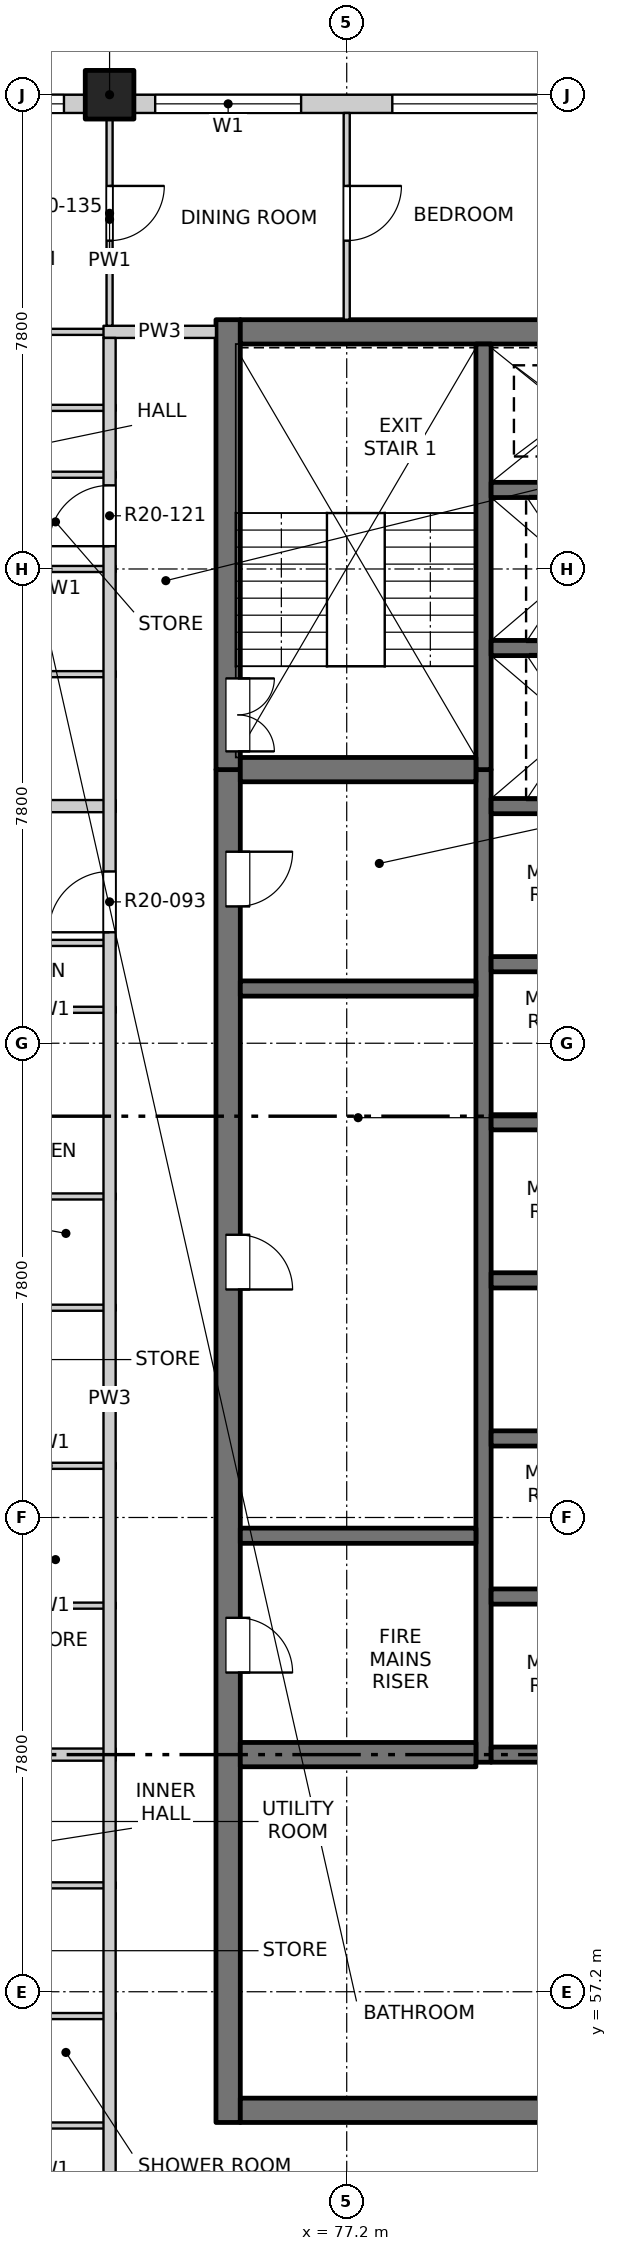
"""IFC4 building model, lengths in metres.
Left out: names, types, materials, properties, quantities, classifications, styles, units other than length and angle.
Written with IfcOpenShell. Run it as: python <this file> out.ifc"""

import sys

from ifc_helpers import new_model, si_unit, direction, frame, frame_2d, origin, origin_2d, place, context, subcontext, project, spatial, rectangle, extrude, element, fill, save


model = new_model("IFC4")
c1 = context("Model", 3, precision=1e-05, world=origin(), true_north=direction((0.0, 1.0)))
c2 = subcontext(c1, "Body", "Model", "MODEL_VIEW")
j1 = project(units=[si_unit("LENGTHUNIT", "METRE"), si_unit("PLANEANGLEUNIT", "RADIAN")], contexts=[c1])
p1 = place(None, origin())
s1 = spatial("IfcSite", under=j1, at=p1, CompositionType="ELEMENT")
p2 = place(p1, origin())
s2 = spatial("IfcBuilding", under=s1, at=p2, CompositionType="ELEMENT")
p3 = place(p2, frame((0.0, 0.0, 204.1)))
s3 = spatial("IfcBuildingStorey", under=s2, at=p3, CompositionType="ELEMENT", Elevation=204.1)
p4 = place(p3, frame((73.3, 88.4, -0.25), z_axis=(0.0, 0.0, 1.0), x_axis=(1.0, 0.0, 0.0)))
e1 = element("IfcColumn", 1, at=p4, inside=s3, PredefinedType="COLUMN", context=c2, shape_type="SweptSolid", body=[
    extrude(rectangle(XDim=0.8, YDim=0.8, at=origin_2d()), origin(), (0.0, 0.0, 1.0), 3.4),
])
p5 = place(p3, frame((75.25, 55.05, -0.25), z_axis=(0.0, 0.0, 1.0), x_axis=(0.0, 1.0, 0.0)))
e2 = element("IfcWall", 2, at=p5, inside=s3, PredefinedType="SOLIDWALL", context=c2, shape_type="SweptSolid", body=[
    extrude(rectangle(XDim=22.25, YDim=0.4, at=frame_2d((11.125, 0.0))), origin(), (0.0, 0.0, 1.0), 3.4),
])
p6 = place(p5, frame((7.4, 0.0, 0.25)))
e3 = element("IfcOpeningElement", 3, at=p6, cuts=e2, PredefinedType="OPENING", context=c2, shape_type="SweptSolid", body=[
    extrude(rectangle(XDim=0.9, YDim=2.1, at=frame_2d((0.45, 1.05))), frame((0.0, 0.21, 0.0), z_axis=(0.0, -1.0, 0.0), x_axis=(1.0, 0.0, 0.0)), (0.0, 0.0, 1.0), 0.42),
])
p7 = place(p5, frame((13.7, 0.0, 0.25)))
e4 = element("IfcOpeningElement", 4, at=p7, cuts=e2, PredefinedType="OPENING", context=c2, shape_type="SweptSolid", body=[
    extrude(rectangle(XDim=0.9, YDim=2.1, at=frame_2d((0.45, 1.05))), frame((0.0, 0.21, 0.0), z_axis=(0.0, -1.0, 0.0), x_axis=(1.0, 0.0, 0.0)), (0.0, 0.0, 1.0), 0.42),
])
p8 = place(p5, frame((20.0, 0.0, 0.25)))
e5 = element("IfcOpeningElement", 5, at=p8, cuts=e2, PredefinedType="OPENING", context=c2, shape_type="SweptSolid", body=[
    extrude(rectangle(XDim=0.9, YDim=2.1, at=frame_2d((0.45, 1.05))), frame((0.0, 0.21, 0.0), z_axis=(0.0, -1.0, 0.0), x_axis=(1.0, 0.0, 0.0)), (0.0, 0.0, 1.0), 0.42),
])
p9 = place(p3, frame((75.25, 77.3, -0.25), z_axis=(0.0, 0.0, 1.0), x_axis=(0.0, 1.0, 0.0)))
e6 = element("IfcWall", 6, at=p9, inside=s3, PredefinedType="SOLIDWALL", context=c2, shape_type="SweptSolid", body=[
    extrude(rectangle(XDim=7.4, YDim=0.4, at=frame_2d((3.7, 0.0))), origin(), (0.0, 0.0, 1.0), 3.4),
])
p10 = place(p9, frame((0.3, 0.0, 0.25)))
e7 = element("IfcOpeningElement", 7, at=p10, cuts=e6, PredefinedType="OPENING", context=c2, shape_type="SweptSolid", body=[
    extrude(rectangle(XDim=1.2, YDim=2.1, at=frame_2d((0.6, 1.05))), frame((0.0, 0.21, 0.0), z_axis=(0.0, -1.0, 0.0), x_axis=(1.0, 0.0, 0.0)), (0.0, 0.0, 1.0), 0.42),
])
p11 = place(p3, frame((75.45, 55.25, -0.25), z_axis=(0.0, 0.0, 1.0), x_axis=(1.0, 0.0, 0.0)))
e8 = element("IfcWall", 8, at=p11, inside=s3, PredefinedType="SOLIDWALL", context=c2, shape_type="SweptSolid", body=[
    extrude(rectangle(XDim=19.1, YDim=0.4, at=frame_2d((9.55, 0.0))), origin(), (0.0, 0.0, 1.0), 3.4),
])
p12 = place(p11, frame((8.8, 0.0, 0.25)))
e9 = element("IfcOpeningElement", 9, at=p12, cuts=e8, PredefinedType="OPENING", context=c2, shape_type="SweptSolid", body=[
    extrude(rectangle(XDim=1.5, YDim=2.1, at=frame_2d((0.75, 1.05))), frame((0.0, 0.21, 0.0), z_axis=(0.0, -1.0, 0.0), x_axis=(1.0, 0.0, 0.0)), (0.0, 0.0, 1.0), 0.42),
])
p13 = place(p3, frame((75.45, 84.5, -0.25), z_axis=(0.0, 0.0, 1.0), x_axis=(1.0, 0.0, 0.0)))
e10 = element("IfcWall", 10, at=p13, inside=s3, PredefinedType="SOLIDWALL", context=c2, shape_type="SweptSolid", body=[
    extrude(rectangle(XDim=19.1, YDim=0.4, at=frame_2d((9.55, 0.0))), origin(), (0.0, 0.0, 1.0), 3.4),
])
p14 = place(p3, frame((79.45, 60.975, -0.25), z_axis=(0.0, 0.0, 1.0), x_axis=(0.0, 1.0, 0.0)))
e11 = element("IfcWall", 11, at=p14, inside=s3, PredefinedType="SOLIDWALL", context=c2, shape_type="SweptSolid", body=[
    extrude(rectangle(XDim=16.325, YDim=0.25, at=frame_2d((8.163, 0.0))), origin(), (0.0, 0.0, 1.0), 3.4),
])
p15 = place(p3, frame((79.45, 77.3, -0.25), z_axis=(0.0, 0.0, 1.0), x_axis=(0.0, 1.0, 0.0)))
e12 = element("IfcWall", 12, at=p15, inside=s3, PredefinedType="SOLIDWALL", context=c2, shape_type="SweptSolid", body=[
    extrude(rectangle(XDim=7.0, YDim=0.25, at=frame_2d((3.5, 0.0))), origin(), (0.0, 0.0, 1.0), 3.4),
])
for number, where, z_axis, x_axis in (
    (13, (79.575, 61.1, -0.25), (0.0, 0.0, 1.0), (1.0, 0.0, 0.0)),
    (14, (79.575, 63.7, -0.25), (0.0, 0.0, 1.0), (1.0, 0.0, 0.0)),
    (15, (79.575, 66.3, -0.25), (0.0, 0.0, 1.0), (1.0, 0.0, 0.0)),
    (16, (79.575, 68.9, -0.25), (0.0, 0.0, 1.0), (1.0, 0.0, 0.0)),
    (17, (79.575, 71.5, -0.25), (0.0, 0.0, 1.0), (1.0, 0.0, 0.0)),
    (18, (79.575, 74.1, -0.25), (0.0, 0.0, 1.0), (1.0, 0.0, 0.0)),
    (19, (79.575, 76.7, -0.25), (0.0, 0.0, 1.0), (1.0, 0.0, 0.0)),
    (20, (79.575, 79.3, -0.25), (0.0, 0.0, 1.0), (1.0, 0.0, 0.0)),
    (21, (79.575, 81.9, -0.25), (0.0, 0.0, 1.0), (1.0, 0.0, 0.0)),
):
    element("IfcWall", number, at=place(p3, frame(where, z_axis=z_axis, x_axis=x_axis)), inside=s3, PredefinedType="SOLIDWALL", context=c2, shape_type="SweptSolid", body=[
        extrude(rectangle(XDim=3.0, YDim=0.25, at=frame_2d((1.5, 0.0))), origin(), (0.0, 0.0, 1.0), 3.4),
    ])
p16 = place(p3, frame((75.45, 61.1, -0.25), z_axis=(0.0, 0.0, 1.0), x_axis=(1.0, 0.0, 0.0)))
e22 = element("IfcWall", 22, at=p16, inside=s3, PredefinedType="SOLIDWALL", context=c2, shape_type="SweptSolid", body=[
    extrude(rectangle(XDim=3.875, YDim=0.4, at=frame_2d((1.938, 0.0))), origin(), (0.0, 0.0, 1.0), 3.4),
])
for number, where, z_axis, x_axis in (
    (23, (75.45, 64.7, -0.25), (0.0, 0.0, 1.0), (1.0, 0.0, 0.0)),
    (24, (75.45, 73.7, -0.25), (0.0, 0.0, 1.0), (1.0, 0.0, 0.0)),
):
    element("IfcWall", number, at=place(p3, frame(where, z_axis=z_axis, x_axis=x_axis)), inside=s3, PredefinedType="SOLIDWALL", context=c2, shape_type="SweptSolid", body=[
        extrude(rectangle(XDim=3.875, YDim=0.25, at=frame_2d((1.938, 0.0))), origin(), (0.0, 0.0, 1.0), 3.4),
    ])
p17 = place(p3, frame((75.45, 77.3, -0.25), z_axis=(0.0, 0.0, 1.0), x_axis=(1.0, 0.0, 0.0)))
e25 = element("IfcWall", 25, at=p17, inside=s3, PredefinedType="SOLIDWALL", context=c2, shape_type="SweptSolid", body=[
    extrude(rectangle(XDim=3.875, YDim=0.4, at=frame_2d((1.938, 0.0))), origin(), (0.0, 0.0, 1.0), 3.4),
])
p18 = place(p3, frame((65.5, 88.25, 0.0), z_axis=(0.0, 0.0, 1.0), x_axis=(1.0, 0.0, 0.0)))
e26 = element("IfcWall", 26, at=p18, inside=s3, PredefinedType="SOLIDWALL", context=c2, shape_type="SweptSolid", body=[
    extrude(rectangle(XDim=7.4, YDim=0.3, at=frame_2d((3.7, 0.0))), origin(), (0.0, 0.0, 1.0), 2.7),
])
p19 = place(p18, frame((0.75, 0.0, 0.9)))
e27 = element("IfcOpeningElement", 27, at=p19, cuts=e26, PredefinedType="OPENING", context=c2, shape_type="SweptSolid", body=[
    extrude(rectangle(XDim=2.4, YDim=1.8, at=frame_2d((1.2, 0.9))), frame((0.0, 0.16, 0.0), z_axis=(0.0, -1.0, 0.0), x_axis=(1.0, 0.0, 0.0)), (0.0, 0.0, 1.0), 0.32),
])
p20 = place(p18, frame((4.65, 0.0, 0.9)))
e28 = element("IfcOpeningElement", 28, at=p20, cuts=e26, PredefinedType="OPENING", context=c2, shape_type="SweptSolid", body=[
    extrude(rectangle(XDim=2.4, YDim=1.8, at=frame_2d((1.2, 0.9))), frame((0.0, 0.16, 0.0), z_axis=(0.0, -1.0, 0.0), x_axis=(1.0, 0.0, 0.0)), (0.0, 0.0, 1.0), 0.32),
])
p21 = place(p3, frame((73.7, 88.25, 0.0), z_axis=(0.0, 0.0, 1.0), x_axis=(1.0, 0.0, 0.0)))
e29 = element("IfcWall", 29, at=p21, inside=s3, PredefinedType="SOLIDWALL", context=c2, shape_type="SweptSolid", body=[
    extrude(rectangle(XDim=22.6, YDim=0.3, at=frame_2d((11.3, 0.0))), origin(), (0.0, 0.0, 1.0), 2.7),
])
p22 = place(p21, frame((0.35, 0.0, 0.9)))
e30 = element("IfcOpeningElement", 30, at=p22, cuts=e29, PredefinedType="OPENING", context=c2, shape_type="SweptSolid", body=[
    extrude(rectangle(XDim=2.4, YDim=1.8, at=frame_2d((1.2, 0.9))), frame((0.0, 0.16, 0.0), z_axis=(0.0, -1.0, 0.0), x_axis=(1.0, 0.0, 0.0)), (0.0, 0.0, 1.0), 0.32),
])
p23 = place(p21, frame((4.25, 0.0, 0.9)))
e31 = element("IfcOpeningElement", 31, at=p23, cuts=e29, PredefinedType="OPENING", context=c2, shape_type="SweptSolid", body=[
    extrude(rectangle(XDim=2.4, YDim=1.8, at=frame_2d((1.2, 0.9))), frame((0.0, 0.16, 0.0), z_axis=(0.0, -1.0, 0.0), x_axis=(1.0, 0.0, 0.0)), (0.0, 0.0, 1.0), 0.32),
])
p24 = place(p21, frame((8.15, 0.0, 0.9)))
e32 = element("IfcOpeningElement", 32, at=p24, cuts=e29, PredefinedType="OPENING", context=c2, shape_type="SweptSolid", body=[
    extrude(rectangle(XDim=2.4, YDim=1.8, at=frame_2d((1.2, 0.9))), frame((0.0, 0.16, 0.0), z_axis=(0.0, -1.0, 0.0), x_axis=(1.0, 0.0, 0.0)), (0.0, 0.0, 1.0), 0.32),
])
p25 = place(p21, frame((12.05, 0.0, 0.9)))
e33 = element("IfcOpeningElement", 33, at=p25, cuts=e29, PredefinedType="OPENING", context=c2, shape_type="SweptSolid", body=[
    extrude(rectangle(XDim=2.4, YDim=1.8, at=frame_2d((1.2, 0.9))), frame((0.0, 0.16, 0.0), z_axis=(0.0, -1.0, 0.0), x_axis=(1.0, 0.0, 0.0)), (0.0, 0.0, 1.0), 0.32),
])
p26 = place(p21, frame((15.95, 0.0, 0.9)))
e34 = element("IfcOpeningElement", 34, at=p26, cuts=e29, PredefinedType="OPENING", context=c2, shape_type="SweptSolid", body=[
    extrude(rectangle(XDim=2.4, YDim=1.8, at=frame_2d((1.2, 0.9))), frame((0.0, 0.16, 0.0), z_axis=(0.0, -1.0, 0.0), x_axis=(1.0, 0.0, 0.0)), (0.0, 0.0, 1.0), 0.32),
])
p27 = place(p21, frame((19.85, 0.0, 0.9)))
e35 = element("IfcOpeningElement", 35, at=p27, cuts=e29, PredefinedType="OPENING", context=c2, shape_type="SweptSolid", body=[
    extrude(rectangle(XDim=2.4, YDim=1.8, at=frame_2d((1.2, 0.9))), frame((0.0, 0.16, 0.0), z_axis=(0.0, -1.0, 0.0), x_axis=(1.0, 0.0, 0.0)), (0.0, 0.0, 1.0), 0.32),
])
for number, where, z_axis, x_axis in (
    (36, (71.18, 55.0, 0.0), (0.0, 0.0, 1.0), (1.0, 0.0, 0.0)),
    (37, (71.18, 56.8, 0.0), (0.0, 0.0, 1.0), (1.0, 0.0, 0.0)),
    (38, (71.18, 58.95, 0.0), (0.0, 0.0, 1.0), (1.0, 0.0, 0.0)),
):
    element("IfcWall", number, at=place(p3, frame(where, z_axis=z_axis, x_axis=x_axis)), inside=s3, PredefinedType="PARTITIONING", context=c2, shape_type="SweptSolid", body=[
        extrude(rectangle(XDim=2.22, YDim=0.1, at=frame_2d((1.11, 0.0))), origin(), (0.0, 0.0, 1.0), 3.15),
    ])
p28 = place(p3, frame((61.9, 61.1, 0.0), z_axis=(0.0, 0.0, 1.0), x_axis=(1.0, 0.0, 0.0)))
e39 = element("IfcWall", 39, at=p28, inside=s3, PredefinedType="PARTITIONING", context=c2, shape_type="SweptSolid", body=[
    extrude(rectangle(XDim=11.5, YDim=0.2, at=frame_2d((5.75, 0.0))), origin(), (0.0, 0.0, 1.0), 2.55),
])
for number, where, z_axis, x_axis in (
    (40, (71.18, 63.55, 0.0), (0.0, 0.0, 1.0), (1.0, 0.0, 0.0)),
    (41, (71.18, 65.85, 0.0), (0.0, 0.0, 1.0), (1.0, 0.0, 0.0)),
    (42, (71.18, 68.45, 0.0), (0.0, 0.0, 1.0), (1.0, 0.0, 0.0)),
    (43, (71.18, 70.28, 0.0), (0.0, 0.0, 1.0), (1.0, 0.0, 0.0)),
    (44, (71.18, 73.35, 0.0), (0.0, 0.0, 1.0), (1.0, 0.0, 0.0)),
    (45, (71.18, 74.45, 0.0), (0.0, 0.0, 1.0), (1.0, 0.0, 0.0)),
):
    element("IfcWall", number, at=place(p3, frame(where, z_axis=z_axis, x_axis=x_axis)), inside=s3, PredefinedType="PARTITIONING", context=c2, shape_type="SweptSolid", body=[
        extrude(rectangle(XDim=2.22, YDim=0.1, at=frame_2d((1.11, 0.0))), origin(), (0.0, 0.0, 1.0), 3.15),
    ])
p29 = place(p3, frame((61.9, 76.7, 0.0), z_axis=(0.0, 0.0, 1.0), x_axis=(1.0, 0.0, 0.0)))
e46 = element("IfcWall", 46, at=p29, inside=s3, PredefinedType="PARTITIONING", context=c2, shape_type="SweptSolid", body=[
    extrude(rectangle(XDim=11.5, YDim=0.2, at=frame_2d((5.75, 0.0))), origin(), (0.0, 0.0, 1.0), 2.55),
])
for number, where, z_axis, x_axis in (
    (47, (71.18, 78.87, 0.0), (0.0, 0.0, 1.0), (1.0, 0.0, 0.0)),
    (48, (71.18, 80.6, 0.0), (0.0, 0.0, 1.0), (1.0, 0.0, 0.0)),
    (49, (71.18, 82.15, 0.0), (0.0, 0.0, 1.0), (1.0, 0.0, 0.0)),
    (50, (71.18, 83.25, 0.0), (0.0, 0.0, 1.0), (1.0, 0.0, 0.0)),
):
    element("IfcWall", number, at=place(p3, frame(where, z_axis=z_axis, x_axis=x_axis)), inside=s3, PredefinedType="PARTITIONING", context=c2, shape_type="SweptSolid", body=[
        extrude(rectangle(XDim=2.22, YDim=0.1, at=frame_2d((1.11, 0.0))), origin(), (0.0, 0.0, 1.0), 3.15),
    ])
p30 = place(p3, frame((61.9, 84.5, 0.0), z_axis=(0.0, 0.0, 1.0), x_axis=(1.0, 0.0, 0.0)))
e51 = element("IfcWall", 51, at=p30, inside=s3, PredefinedType="PARTITIONING", context=c2, shape_type="SweptSolid", body=[
    extrude(rectangle(XDim=11.5, YDim=0.1, at=frame_2d((5.75, 0.0))), origin(), (0.0, 0.0, 1.0), 3.15),
])
p31 = place(p30, frame((7.965, 0.0, 0.0)))
e52 = element("IfcOpeningElement", 52, at=p31, cuts=e51, PredefinedType="OPENING", context=c2, shape_type="SweptSolid", body=[
    extrude(rectangle(XDim=0.9, YDim=2.1, at=frame_2d((0.45, 1.05))), frame((0.0, 0.06, 0.0), z_axis=(0.0, -1.0, 0.0), x_axis=(1.0, 0.0, 0.0)), (0.0, 0.0, 1.0), 0.12),
])
p32 = place(p3, frame((73.2, 84.5, 0.0), z_axis=(0.0, 0.0, 1.0), x_axis=(1.0, 0.0, 0.0)))
e53 = element("IfcWall", 53, at=p32, inside=s3, PredefinedType="PARTITIONING", context=c2, shape_type="SweptSolid", body=[
    extrude(rectangle(XDim=1.85, YDim=0.2, at=frame_2d((0.925, 0.0))), origin(), (0.0, 0.0, 1.0), 3.15),
])
p33 = place(p3, frame((73.3, 49.5, 0.0), z_axis=(0.0, 0.0, 1.0), x_axis=(0.0, 1.0, 0.0)))
e54 = element("IfcWall", 54, at=p33, inside=s3, PredefinedType="PARTITIONING", context=c2, shape_type="SweptSolid", body=[
    extrude(rectangle(XDim=34.9, YDim=0.2, at=frame_2d((17.45, 0.0))), origin(), (0.0, 0.0, 1.0), 3.15),
])
p34 = place(p33, frame((3.225, 0.0, 0.0)))
e55 = element("IfcOpeningElement", 55, at=p34, cuts=e54, PredefinedType="OPENING", context=c2, shape_type="SweptSolid", body=[
    extrude(rectangle(XDim=1.0, YDim=2.1, at=frame_2d((0.5, 1.05))), frame((0.0, 0.11, 0.0), z_axis=(0.0, -1.0, 0.0), x_axis=(1.0, 0.0, 0.0)), (0.0, 0.0, 1.0), 0.22),
])
p35 = place(p33, frame((25.125, 0.0, 0.0)))
e56 = element("IfcOpeningElement", 56, at=p35, cuts=e54, PredefinedType="OPENING", context=c2, shape_type="SweptSolid", body=[
    extrude(rectangle(XDim=1.0, YDim=2.1, at=frame_2d((0.5, 1.05))), frame((0.0, 0.11, 0.0), z_axis=(0.0, -1.0, 0.0), x_axis=(1.0, 0.0, 0.0)), (0.0, 0.0, 1.0), 0.22),
])
p36 = place(p33, frame((31.475, 0.0, 0.0)))
e57 = element("IfcOpeningElement", 57, at=p36, cuts=e54, PredefinedType="OPENING", context=c2, shape_type="SweptSolid", body=[
    extrude(rectangle(XDim=1.0, YDim=2.1, at=frame_2d((0.5, 1.05))), frame((0.0, 0.11, 0.0), z_axis=(0.0, -1.0, 0.0), x_axis=(1.0, 0.0, 0.0)), (0.0, 0.0, 1.0), 0.22),
])
p37 = place(p3, frame((73.3, 84.6, 0.0), z_axis=(0.0, 0.0, 1.0), x_axis=(0.0, 1.0, 0.0)))
e58 = element("IfcWall", 58, at=p37, inside=s3, PredefinedType="PARTITIONING", context=c2, shape_type="SweptSolid", body=[
    extrude(rectangle(XDim=3.5, YDim=0.1, at=frame_2d((1.75, 0.0))), origin(), (0.0, 0.0, 1.0), 3.15),
])
p38 = place(p37, frame((1.4, 0.0, 0.0)))
e59 = element("IfcOpeningElement", 59, at=p38, cuts=e58, PredefinedType="OPENING", context=c2, shape_type="SweptSolid", body=[
    extrude(rectangle(XDim=0.9, YDim=2.1, at=frame_2d((0.45, 1.05))), frame((0.0, 0.06, 0.0), z_axis=(0.0, -1.0, 0.0), x_axis=(1.0, 0.0, 0.0)), (0.0, 0.0, 1.0), 0.12),
])
p39 = place(p3, frame((77.2, 84.7, 0.0), z_axis=(0.0, 0.0, 1.0), x_axis=(0.0, 1.0, 0.0)))
e60 = element("IfcWall", 60, at=p39, inside=s3, PredefinedType="PARTITIONING", context=c2, shape_type="SweptSolid", body=[
    extrude(rectangle(XDim=3.4, YDim=0.1, at=frame_2d((1.7, 0.0))), origin(), (0.0, 0.0, 1.0), 3.15),
])
p40 = place(p39, frame((1.3, 0.0, 0.0)))
e61 = element("IfcOpeningElement", 61, at=p40, cuts=e60, PredefinedType="OPENING", context=c2, shape_type="SweptSolid", body=[
    extrude(rectangle(XDim=0.9, YDim=2.1, at=frame_2d((0.45, 1.05))), frame((0.0, 0.06, 0.0), z_axis=(0.0, -1.0, 0.0), x_axis=(1.0, 0.0, 0.0)), (0.0, 0.0, 1.0), 0.12),
])
p41 = place(p20, origin())
e62 = element("IfcWindow", 62, at=p41, inside=s3, PartitioningType="DOUBLE_PANEL_VERTICAL", PredefinedType="WINDOW", context=c2, shape_type="SweptSolid", body=[
    extrude(rectangle(XDim=2.4, YDim=1.8, at=frame_2d((1.2, 0.9))), frame((0.0, 0.03, 0.0), z_axis=(0.0, -1.0, 0.0), x_axis=(1.0, 0.0, 0.0)), (0.0, 0.0, 1.0), 0.06),
])
fill(e28, e62)
p42 = place(p22, origin())
e63 = element("IfcWindow", 63, at=p42, inside=s3, PartitioningType="DOUBLE_PANEL_VERTICAL", PredefinedType="WINDOW", context=c2, shape_type="SweptSolid", body=[
    extrude(rectangle(XDim=2.4, YDim=1.8, at=frame_2d((1.2, 0.9))), frame((0.0, 0.03, 0.0), z_axis=(0.0, -1.0, 0.0), x_axis=(1.0, 0.0, 0.0)), (0.0, 0.0, 1.0), 0.06),
])
fill(e30, e63)
p43 = place(p23, origin())
e64 = element("IfcWindow", 64, at=p43, inside=s3, PartitioningType="DOUBLE_PANEL_VERTICAL", PredefinedType="WINDOW", context=c2, shape_type="SweptSolid", body=[
    extrude(rectangle(XDim=2.4, YDim=1.8, at=frame_2d((1.2, 0.9))), frame((0.0, 0.03, 0.0), z_axis=(0.0, -1.0, 0.0), x_axis=(1.0, 0.0, 0.0)), (0.0, 0.0, 1.0), 0.06),
])
fill(e31, e64)
p44 = place(p6, origin())
e65 = element("IfcDoor", 65, at=p44, inside=s3, OperationType="SINGLE_SWING_RIGHT", PredefinedType="DOOR", context=c2, shape_type="SweptSolid", body=[
    extrude(rectangle(XDim=0.9, YDim=2.1, at=frame_2d((0.45, 1.05))), frame((0.0, -0.135, 0.0), z_axis=(0.0, -1.0, 0.0), x_axis=(1.0, 0.0, 0.0)), (0.0, 0.0, 1.0), 0.05),
])
fill(e3, e65)
p45 = place(p7, origin())
e66 = element("IfcDoor", 66, at=p45, inside=s3, OperationType="SINGLE_SWING_RIGHT", PredefinedType="DOOR", context=c2, shape_type="SweptSolid", body=[
    extrude(rectangle(XDim=0.9, YDim=2.1, at=frame_2d((0.45, 1.05))), frame((0.0, -0.135, 0.0), z_axis=(0.0, -1.0, 0.0), x_axis=(1.0, 0.0, 0.0)), (0.0, 0.0, 1.0), 0.05),
])
fill(e4, e66)
p46 = place(p35, origin())
e67 = element("IfcDoor", 67, at=p46, inside=s3, OperationType="SINGLE_SWING_RIGHT", PredefinedType="DOOR", context=c2, shape_type="SweptSolid", body=[
    extrude(rectangle(XDim=1.0, YDim=2.1, at=frame_2d((0.5, 1.05))), frame((0.0, 0.025, 0.0), z_axis=(0.0, -1.0, 0.0), x_axis=(1.0, 0.0, 0.0)), (0.0, 0.0, 1.0), 0.05),
])
fill(e56, e67)
p47 = place(p8, origin())
e68 = element("IfcDoor", 68, at=p47, inside=s3, OperationType="SINGLE_SWING_LEFT", PredefinedType="DOOR", context=c2, shape_type="SweptSolid", body=[
    extrude(rectangle(XDim=0.9, YDim=2.1, at=frame_2d((0.45, 1.05))), frame((0.0, -0.135, 0.0), z_axis=(0.0, -1.0, 0.0), x_axis=(1.0, 0.0, 0.0)), (0.0, 0.0, 1.0), 0.05),
])
fill(e5, e68)
p48 = place(p10, origin())
e69 = element("IfcDoor", 69, at=p48, inside=s3, OperationType="DOUBLE_DOOR_SINGLE_SWING", PredefinedType="DOOR", context=c2, shape_type="SweptSolid", body=[
    extrude(rectangle(XDim=1.2, YDim=2.1, at=frame_2d((0.6, 1.05))), frame((0.0, -0.135, 0.0), z_axis=(0.0, -1.0, 0.0), x_axis=(1.0, 0.0, 0.0)), (0.0, 0.0, 1.0), 0.05),
])
fill(e7, e69)
p49 = place(p36, origin())
e70 = element("IfcDoor", 70, at=p49, inside=s3, OperationType="SINGLE_SWING_LEFT", PredefinedType="DOOR", context=c2, shape_type="SweptSolid", body=[
    extrude(rectangle(XDim=1.0, YDim=2.1, at=frame_2d((0.5, 1.05))), frame((0.0, 0.025, 0.0), z_axis=(0.0, -1.0, 0.0), x_axis=(1.0, 0.0, 0.0)), (0.0, 0.0, 1.0), 0.05),
])
fill(e57, e70)
p50 = place(p38, origin())
e71 = element("IfcDoor", 71, at=p50, inside=s3, OperationType="SINGLE_SWING_LEFT", PredefinedType="DOOR", context=c2, shape_type="SweptSolid", body=[
    extrude(rectangle(XDim=0.9, YDim=2.1, at=frame_2d((0.45, 1.05))), frame((0.0, 0.025, 0.0), z_axis=(0.0, -1.0, 0.0), x_axis=(1.0, 0.0, 0.0)), (0.0, 0.0, 1.0), 0.05),
])
fill(e59, e71)
p51 = place(p40, origin())
e72 = element("IfcDoor", 72, at=p51, inside=s3, OperationType="SINGLE_SWING_LEFT", PredefinedType="DOOR", context=c2, shape_type="SweptSolid", body=[
    extrude(rectangle(XDim=0.9, YDim=2.1, at=frame_2d((0.45, 1.05))), frame((0.0, 0.025, 0.0), z_axis=(0.0, -1.0, 0.0), x_axis=(1.0, 0.0, 0.0)), (0.0, 0.0, 1.0), 0.05),
])
fill(e61, e72)
save(model, sys.argv[1])
